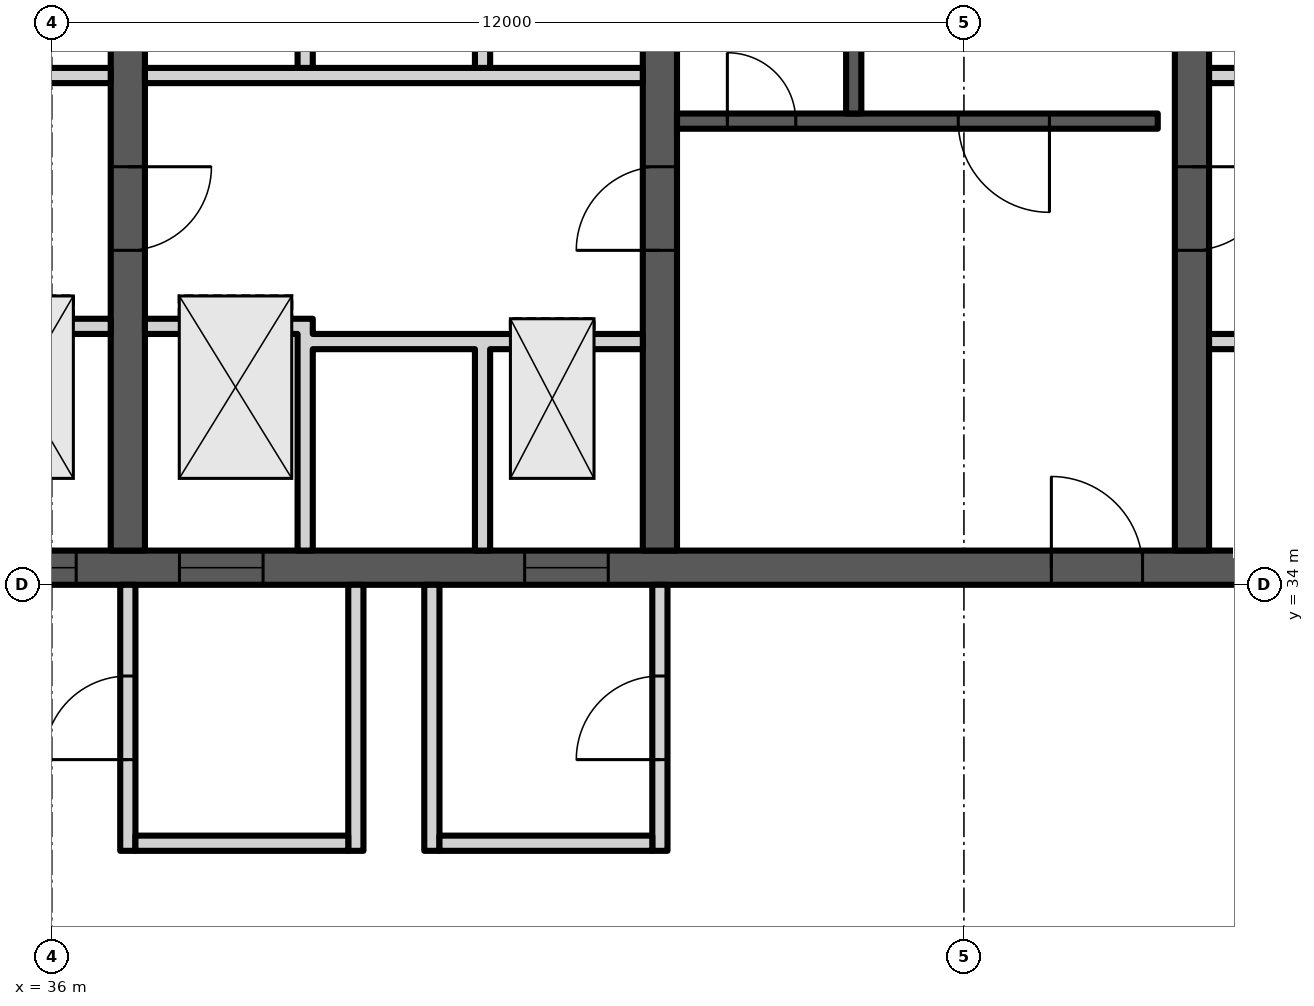
"""IFC4 building model, lengths in metres.
Left out: names, types, materials, properties, quantities, classifications, styles, units other than length and angle.
Written with IfcOpenShell. Run it as: python <this file> out.ifc"""

import sys

from ifc_helpers import new_model, si_unit, direction, frame, frame_2d, origin, place, context, subcontext, project, spatial, polyline, rectangle, outline, extrude, element, fill, save


model = new_model("IFC4")
c1 = context("Model", 3, precision=1e-05, world=origin(), true_north=direction((0.0, 1.0)))
c2 = subcontext(c1, "Body", "Model", "MODEL_VIEW")
j1 = project(units=[si_unit("LENGTHUNIT", "METRE"), si_unit("PLANEANGLEUNIT", "RADIAN")], contexts=[c1])
p1 = place(None, origin())
s1 = spatial("IfcSite", under=j1, at=p1, CompositionType="ELEMENT")
p2 = place(p1, origin())
s2 = spatial("IfcBuilding", under=s1, at=p2, CompositionType="ELEMENT")
p3 = place(p2, frame((0.0, 0.0, 261.1)))
s3 = spatial("IfcBuildingStorey", under=s2, at=p3, CompositionType="ELEMENT", Elevation=261.1)
p4 = place(p3, frame((23.0, 34.225, 0.0), z_axis=(0.0, 0.0, 1.0), x_axis=(1.0, 0.0, 0.0)))
e1 = element("IfcWall", 1, at=p4, inside=s3, PredefinedType="SHEAR", context=c2, shape_type="SweptSolid", body=[
    extrude(outline(polyline([(0.0, 0.0), (35.0, 0.0), (35.0, 3.2), (30.625, 3.2), (26.25, 3.2), (21.875, 3.2), (17.5, 3.2), (13.125, 3.2), (8.75, 3.2), (4.375, 3.2), (0.0, 2.365), (0.0, 0.0)])), frame((0.0, 0.225, 0.0), z_axis=(0.0, -1.0, 0.0), x_axis=(1.0, 0.0, 0.0)), (0.0, 0.0, 1.0), 0.45),
])
p5 = place(p4, frame((0.65, 0.0, 0.0)))
e2 = element("IfcOpeningElement", 2, at=p5, cuts=e1, PredefinedType="OPENING", context=c2, shape_type="SweptSolid", body=[
    extrude(rectangle(XDim=1.2, YDim=2.1, at=frame_2d((0.6, 1.05))), frame((0.0, 0.235, 0.0), z_axis=(0.0, -1.0, 0.0), x_axis=(1.0, 0.0, 0.0)), (0.0, 0.0, 1.0), 0.47),
])
p6 = place(p4, frame((7.679, 0.0, 0.0)))
e3 = element("IfcOpeningElement", 3, at=p6, cuts=e1, PredefinedType="OPENING", context=c2, shape_type="SweptSolid", body=[
    extrude(rectangle(XDim=1.1, YDim=2.1, at=frame_2d((0.55, 1.05))), frame((0.0, 0.235, 0.0), z_axis=(0.0, -1.0, 0.0), x_axis=(1.0, 0.0, 0.0)), (0.0, 0.0, 1.0), 0.47),
])
p7 = place(p4, frame((12.221, 0.0, 0.0)))
e4 = element("IfcOpeningElement", 4, at=p7, cuts=e1, PredefinedType="OPENING", context=c2, shape_type="SweptSolid", body=[
    extrude(rectangle(XDim=1.1, YDim=2.1, at=frame_2d((0.55, 1.05))), frame((0.0, 0.235, 0.0), z_axis=(0.0, -1.0, 0.0), x_axis=(1.0, 0.0, 0.0)), (0.0, 0.0, 1.0), 0.47),
])
p8 = place(p4, frame((9.8, 0.0, 0.0)))
e5 = element("IfcOpeningElement", 5, at=p8, cuts=e1, PredefinedType="OPENING", context=c2, shape_type="SweptSolid", body=[
    extrude(rectangle(XDim=1.4, YDim=2.1, at=frame_2d((0.7, 1.05))), frame((0.0, 0.235, 0.0), z_axis=(0.0, -1.0, 0.0), x_axis=(1.0, 0.0, 0.0)), (0.0, 0.0, 1.0), 0.47),
])
p9 = place(p4, frame((14.679, 0.0, 0.0)))
e6 = element("IfcOpeningElement", 6, at=p9, cuts=e1, PredefinedType="OPENING", context=c2, shape_type="SweptSolid", body=[
    extrude(rectangle(XDim=1.1, YDim=2.1, at=frame_2d((0.55, 1.05))), frame((0.0, 0.235, 0.0), z_axis=(0.0, -1.0, 0.0), x_axis=(1.0, 0.0, 0.0)), (0.0, 0.0, 1.0), 0.47),
])
p10 = place(p4, frame((19.221, 0.0, 0.0)))
e7 = element("IfcOpeningElement", 7, at=p10, cuts=e1, PredefinedType="OPENING", context=c2, shape_type="SweptSolid", body=[
    extrude(rectangle(XDim=1.1, YDim=2.1, at=frame_2d((0.55, 1.05))), frame((0.0, 0.235, 0.0), z_axis=(0.0, -1.0, 0.0), x_axis=(1.0, 0.0, 0.0)), (0.0, 0.0, 1.0), 0.47),
])
p11 = place(p4, frame((26.15, 0.0, 0.0)))
e8 = element("IfcOpeningElement", 8, at=p11, cuts=e1, PredefinedType="OPENING", context=c2, shape_type="SweptSolid", body=[
    extrude(rectangle(XDim=1.2, YDim=2.1, at=frame_2d((0.6, 1.05))), frame((0.0, 0.235, 0.0), z_axis=(0.0, -1.0, 0.0), x_axis=(1.0, 0.0, 0.0)), (0.0, 0.0, 1.0), 0.47),
])
p12 = place(p4, frame((28.729, 0.0, 0.0)))
e9 = element("IfcOpeningElement", 9, at=p12, cuts=e1, PredefinedType="OPENING", context=c2, shape_type="SweptSolid", body=[
    extrude(rectangle(XDim=1.0, YDim=2.1, at=frame_2d((0.5, 1.05))), frame((0.0, 0.235, 0.0), z_axis=(0.0, -1.0, 0.0), x_axis=(1.0, 0.0, 0.0)), (0.0, 0.0, 1.0), 0.47),
])
p13 = place(p4, frame((33.271, 0.0, 0.0)))
e10 = element("IfcOpeningElement", 10, at=p13, cuts=e1, PredefinedType="OPENING", context=c2, shape_type="SweptSolid", body=[
    extrude(rectangle(XDim=1.0, YDim=2.1, at=frame_2d((0.5, 1.05))), frame((0.0, 0.235, 0.0), z_axis=(0.0, -1.0, 0.0), x_axis=(1.0, 0.0, 0.0)), (0.0, 0.0, 1.0), 0.47),
])
p14 = place(p4, frame((30.8, 0.0, 0.0)))
e11 = element("IfcOpeningElement", 11, at=p14, cuts=e1, PredefinedType="OPENING", context=c2, shape_type="SweptSolid", body=[
    extrude(rectangle(XDim=1.4, YDim=2.1, at=frame_2d((0.7, 1.05))), frame((0.0, 0.235, 0.0), z_axis=(0.0, -1.0, 0.0), x_axis=(1.0, 0.0, 0.0)), (0.0, 0.0, 1.0), 0.47),
])
p15 = place(p3, frame((37.0, 34.45, 0.0), z_axis=(0.0, 0.0, 1.0), x_axis=(0.0, 1.0, 0.0)))
e12 = element("IfcWall", 12, at=p15, inside=s3, PredefinedType="SHEAR", context=c2, shape_type="SweptSolid", body=[
    extrude(rectangle(XDim=15.091, YDim=0.45, at=frame_2d((7.545, 0.0))), origin(), (0.0, 0.0, 1.0), 3.2),
])
p16 = place(p15, frame((11.524, 0.0, 0.0)))
e13 = element("IfcOpeningElement", 13, at=p16, cuts=e12, PredefinedType="OPENING", context=c2, shape_type="SweptSolid", body=[
    extrude(rectangle(XDim=1.0, YDim=2.1, at=frame_2d((0.5, 1.05))), frame((0.0, 0.235, 0.0), z_axis=(0.0, -1.0, 0.0), x_axis=(1.0, 0.0, 0.0)), (0.0, 0.0, 1.0), 0.47),
])
p17 = place(p15, frame((3.95, 0.0, 0.0)))
e14 = element("IfcOpeningElement", 14, at=p17, cuts=e12, PredefinedType="OPENING", context=c2, shape_type="SweptSolid", body=[
    extrude(rectangle(XDim=1.1, YDim=2.1, at=frame_2d((0.55, 1.05))), frame((0.0, 0.235, 0.0), z_axis=(0.0, -1.0, 0.0), x_axis=(1.0, 0.0, 0.0)), (0.0, 0.0, 1.0), 0.47),
])
p18 = place(p3, frame((44.0, 34.45, 0.0), z_axis=(0.0, 0.0, 1.0), x_axis=(0.0, 1.0, 0.0)))
e15 = element("IfcWall", 15, at=p18, inside=s3, PredefinedType="SHEAR", context=c2, shape_type="SweptSolid", body=[
    extrude(rectangle(XDim=14.479, YDim=0.45, at=frame_2d((7.239, 0.0))), origin(), (0.0, 0.0, 1.0), 3.2),
])
p19 = place(p18, frame((11.524, 0.0, 0.0)))
e16 = element("IfcOpeningElement", 16, at=p19, cuts=e15, PredefinedType="OPENING", context=c2, shape_type="SweptSolid", body=[
    extrude(rectangle(XDim=1.0, YDim=2.1, at=frame_2d((0.5, 1.05))), frame((0.0, 0.235, 0.0), z_axis=(0.0, -1.0, 0.0), x_axis=(1.0, 0.0, 0.0)), (0.0, 0.0, 1.0), 0.47),
])
p20 = place(p18, frame((3.95, 0.0, 0.0)))
e17 = element("IfcOpeningElement", 17, at=p20, cuts=e15, PredefinedType="OPENING", context=c2, shape_type="SweptSolid", body=[
    extrude(rectangle(XDim=1.1, YDim=2.1, at=frame_2d((0.55, 1.05))), frame((0.0, 0.235, 0.0), z_axis=(0.0, -1.0, 0.0), x_axis=(1.0, 0.0, 0.0)), (0.0, 0.0, 1.0), 0.47),
])
p21 = place(p3, frame((51.0, 34.45, 0.0), z_axis=(0.0, 0.0, 1.0), x_axis=(0.0, 1.0, 0.0)))
e18 = element("IfcWall", 18, at=p21, inside=s3, PredefinedType="SHEAR", context=c2, shape_type="SweptSolid", body=[
    extrude(rectangle(XDim=13.866, YDim=0.45, at=frame_2d((6.933, 0.0))), origin(), (0.0, 0.0, 1.0), 3.2),
])
p22 = place(p21, frame((3.95, 0.0, 0.0)))
e19 = element("IfcOpeningElement", 19, at=p22, cuts=e18, PredefinedType="OPENING", context=c2, shape_type="SweptSolid", body=[
    extrude(rectangle(XDim=1.1, YDim=2.1, at=frame_2d((0.55, 1.05))), frame((0.0, 0.235, 0.0), z_axis=(0.0, -1.0, 0.0), x_axis=(1.0, 0.0, 0.0)), (0.0, 0.0, 1.0), 0.47),
])
p23 = place(p3, frame((30.225, 40.7, 0.0), z_axis=(0.0, 0.0, 1.0), x_axis=(1.0, 0.0, 0.0)))
e20 = element("IfcWall", 20, at=p23, inside=s3, PredefinedType="PARTITIONING", context=c2, shape_type="SweptSolid", body=[
    extrude(rectangle(XDim=6.55, YDim=0.2, at=frame_2d((3.275, 0.0))), origin(), (0.0, 0.0, 1.0), 2.8),
])
p24 = place(p3, frame((0.0, 0.0, -0.0)))
e21 = element("IfcWall", 21, at=p24, inside=s3, PredefinedType="PARTITIONING", context=c2, shape_type="SweptSolid", body=[
    extrude(outline(polyline([(34.567, 37.5), (34.767, 37.5), (36.775, 37.5), (36.775, 37.3), (34.767, 37.3), (34.767, 34.45), (34.567, 34.45), (34.567, 37.5)])), origin(), (0.0, 0.0, 1.0), 2.8),
])
p25 = place(p3, frame((0.0, 0.0, -0.0)))
e22 = element("IfcWall", 22, at=p25, inside=s3, PredefinedType="PARTITIONING", context=c2, shape_type="SweptSolid", body=[
    extrude(outline(polyline([(32.433, 40.8), (32.233, 40.8), (32.233, 43.8), (30.225, 43.8), (30.225, 44.0), (36.775, 44.0), (36.775, 43.8), (34.767, 43.8), (34.767, 40.8), (34.567, 40.8), (34.567, 43.8), (32.433, 43.8), (32.433, 40.8)])), origin(), (0.0, 0.0, 1.0), 2.8),
])
p26 = place(p3, frame((37.225, 40.7, 0.0), z_axis=(0.0, 0.0, 1.0), x_axis=(1.0, 0.0, 0.0)))
e23 = element("IfcWall", 23, at=p26, inside=s3, PredefinedType="PARTITIONING", context=c2, shape_type="SweptSolid", body=[
    extrude(rectangle(XDim=6.55, YDim=0.2, at=frame_2d((3.275, 0.0))), origin(), (0.0, 0.0, 1.0), 2.8),
])
p27 = place(p3, frame((0.0, 0.0, -0.0)))
e24 = element("IfcWall", 24, at=p27, inside=s3, PredefinedType="PARTITIONING", context=c2, shape_type="SweptSolid", body=[
    extrude(outline(polyline([(41.567, 37.1), (39.433, 37.1), (39.433, 34.45), (39.233, 34.45), (39.233, 37.3), (37.225, 37.3), (37.225, 37.5), (39.233, 37.5), (39.433, 37.5), (39.433, 37.3), (41.567, 37.3), (41.767, 37.3), (43.775, 37.3), (43.775, 37.1), (41.767, 37.1), (41.767, 34.45), (41.567, 34.45), (41.567, 37.1)])), origin(), (0.0, 0.0, 1.0), 2.8),
])
p28 = place(p3, frame((0.0, 0.0, -0.0)))
e25 = element("IfcWall", 25, at=p28, inside=s3, PredefinedType="PARTITIONING", context=c2, shape_type="SweptSolid", body=[
    extrude(outline(polyline([(39.433, 40.8), (39.233, 40.8), (39.233, 43.8), (37.225, 43.8), (37.225, 44.0), (43.775, 44.0), (43.775, 43.8), (41.767, 43.8), (41.767, 40.8), (41.567, 40.8), (41.567, 43.8), (39.433, 43.8), (39.433, 40.8)])), origin(), (0.0, 0.0, 1.0), 2.8),
])
p29 = place(p3, frame((44.225, 40.1, 0.0), z_axis=(0.0, 0.0, 1.0), x_axis=(1.0, 0.0, 0.0)))
e26 = element("IfcWall", 26, at=p29, inside=s3, PredefinedType="SHEAR", context=c2, shape_type="SweptSolid", body=[
    extrude(rectangle(XDim=6.325, YDim=0.2, at=frame_2d((3.163, 0.0))), origin(), (0.0, 0.0, 1.0), 2.8),
])
p30 = place(p29, frame((3.7, 0.0, 0.0)))
e27 = element("IfcOpeningElement", 27, at=p30, cuts=e26, PredefinedType="OPENING", context=c2, shape_type="SweptSolid", body=[
    extrude(rectangle(XDim=1.2, YDim=2.1, at=frame_2d((0.6, 1.05))), frame((0.0, 0.11, 0.0), z_axis=(0.0, -1.0, 0.0), x_axis=(1.0, 0.0, 0.0)), (0.0, 0.0, 1.0), 0.22),
])
p31 = place(p29, frame((0.663, 0.0, 0.0)))
e28 = element("IfcOpeningElement", 28, at=p31, cuts=e26, PredefinedType="OPENING", context=c2, shape_type="SweptSolid", body=[
    extrude(rectangle(XDim=0.9, YDim=2.1, at=frame_2d((0.45, 1.05))), frame((0.0, 0.11, 0.0), z_axis=(0.0, -1.0, 0.0), x_axis=(1.0, 0.0, 0.0)), (0.0, 0.0, 1.0), 0.22),
])
p32 = place(p3, frame((46.55, 40.2, 0.0), z_axis=(0.0, 0.0, 1.0), x_axis=(0.0, 1.0, 0.0)))
e29 = element("IfcWall", 29, at=p32, inside=s3, PredefinedType="SHEAR", context=c2, shape_type="SweptSolid", body=[
    extrude(rectangle(XDim=7.2, YDim=0.2, at=frame_2d((3.6, 0.0))), origin(), (0.0, 0.0, 1.0), 2.8),
])
p33 = place(p3, frame((51.225, 37.2, 0.0), z_axis=(0.0, 0.0, 1.0), x_axis=(1.0, 0.0, 0.0)))
e30 = element("IfcWall", 30, at=p33, inside=s3, PredefinedType="PARTITIONING", context=c2, shape_type="SweptSolid", body=[
    extrude(rectangle(XDim=2.008, YDim=0.2, at=frame_2d((1.004, 0.0))), origin(), (0.0, 0.0, 1.0), 2.8),
])
p34 = place(p33, frame((0.504, 0.0, 0.0)))
e31 = element("IfcOpeningElement", 31, at=p34, cuts=e30, PredefinedType="OPENING", context=c2, shape_type="SweptSolid", body=[
    extrude(rectangle(XDim=1.0, YDim=2.1, at=frame_2d((0.5, 1.05))), frame((0.0, 0.11, 0.0), z_axis=(0.0, -1.0, 0.0), x_axis=(1.0, 0.0, 0.0)), (0.0, 0.0, 1.0), 0.22),
])
p35 = place(p3, frame((51.225, 40.7, 0.0), z_axis=(0.0, 0.0, 1.0), x_axis=(1.0, 0.0, 0.0)))
e32 = element("IfcWall", 32, at=p35, inside=s3, PredefinedType="PARTITIONING", context=c2, shape_type="SweptSolid", body=[
    extrude(rectangle(XDim=6.55, YDim=0.2, at=frame_2d((3.275, 0.0))), origin(), (0.0, 0.0, 1.0), 2.8),
])
p36 = place(p35, frame((3.879, 0.0, 0.0)))
e33 = element("IfcOpeningElement", 33, at=p36, cuts=e32, PredefinedType="OPENING", context=c2, shape_type="SweptSolid", body=[
    extrude(rectangle(XDim=1.0, YDim=2.1, at=frame_2d((0.5, 1.05))), frame((0.0, 0.11, 0.0), z_axis=(0.0, -1.0, 0.0), x_axis=(1.0, 0.0, 0.0)), (0.0, 0.0, 1.0), 0.22),
])
p37 = place(p3, frame((37.0, 30.5, 0.0), z_axis=(0.0, 0.0, 1.0), x_axis=(0.0, 1.0, 0.0)))
e34 = element("IfcWall", 34, at=p37, inside=s3, PredefinedType="PARTITIONING", context=c2, shape_type="SweptSolid", body=[
    extrude(rectangle(XDim=3.5, YDim=0.2, at=frame_2d((1.75, 0.0))), origin(), (0.0, 0.0, 1.0), 2.8),
])
p38 = place(p37, frame((1.2, 0.0, 0.0)))
e35 = element("IfcOpeningElement", 35, at=p38, cuts=e34, PredefinedType="OPENING", context=c2, shape_type="SweptSolid", body=[
    extrude(rectangle(XDim=1.1, YDim=2.1, at=frame_2d((0.55, 1.05))), frame((0.0, 0.11, 0.0), z_axis=(0.0, -1.0, 0.0), x_axis=(1.0, 0.0, 0.0)), (0.0, 0.0, 1.0), 0.22),
])
p39 = place(p3, frame((40.0, 30.5, 0.0), z_axis=(0.0, 0.0, 1.0), x_axis=(0.0, 1.0, 0.0)))
e36 = element("IfcWall", 36, at=p39, inside=s3, PredefinedType="PARTITIONING", context=c2, shape_type="SweptSolid", body=[
    extrude(rectangle(XDim=3.5, YDim=0.2, at=frame_2d((1.75, 0.0))), origin(), (0.0, 0.0, 1.0), 2.8),
])
p40 = place(p3, frame((37.1, 30.6, 0.0), z_axis=(0.0, 0.0, 1.0), x_axis=(1.0, 0.0, 0.0)))
e37 = element("IfcWall", 37, at=p40, inside=s3, PredefinedType="PARTITIONING", context=c2, shape_type="SweptSolid", body=[
    extrude(rectangle(XDim=2.8, YDim=0.2, at=frame_2d((1.4, 0.0))), origin(), (0.0, 0.0, 1.0), 2.8),
])
p41 = place(p3, frame((41.0, 30.5, 0.0), z_axis=(0.0, 0.0, 1.0), x_axis=(0.0, 1.0, 0.0)))
e38 = element("IfcWall", 38, at=p41, inside=s3, PredefinedType="PARTITIONING", context=c2, shape_type="SweptSolid", body=[
    extrude(rectangle(XDim=3.5, YDim=0.2, at=frame_2d((1.75, 0.0))), origin(), (0.0, 0.0, 1.0), 2.8),
])
p42 = place(p3, frame((44.0, 30.5, 0.0), z_axis=(0.0, 0.0, 1.0), x_axis=(0.0, 1.0, 0.0)))
e39 = element("IfcWall", 39, at=p42, inside=s3, PredefinedType="PARTITIONING", context=c2, shape_type="SweptSolid", body=[
    extrude(rectangle(XDim=3.5, YDim=0.2, at=frame_2d((1.75, 0.0))), origin(), (0.0, 0.0, 1.0), 2.8),
])
p43 = place(p42, frame((1.2, 0.0, 0.0)))
e40 = element("IfcOpeningElement", 40, at=p43, cuts=e39, PredefinedType="OPENING", context=c2, shape_type="SweptSolid", body=[
    extrude(rectangle(XDim=1.1, YDim=2.1, at=frame_2d((0.55, 1.05))), frame((0.0, 0.11, 0.0), z_axis=(0.0, -1.0, 0.0), x_axis=(1.0, 0.0, 0.0)), (0.0, 0.0, 1.0), 0.22),
])
p44 = place(p3, frame((41.1, 30.6, 0.0), z_axis=(0.0, 0.0, 1.0), x_axis=(1.0, 0.0, 0.0)))
e41 = element("IfcWall", 41, at=p44, inside=s3, PredefinedType="PARTITIONING", context=c2, shape_type="SweptSolid", body=[
    extrude(rectangle(XDim=2.8, YDim=0.2, at=frame_2d((1.4, 0.0))), origin(), (0.0, 0.0, 1.0), 2.8),
])
p45 = place(p7, origin())
e42 = element("IfcDoor", 42, at=p45, inside=s3, OperationType="DOUBLE_DOOR_SLIDING", PredefinedType="DOOR", context=c2, shape_type="SweptSolid", body=[
    extrude(rectangle(XDim=1.1, YDim=2.1, at=frame_2d((0.55, 1.05))), frame((0.0, 0.025, 0.0), z_axis=(0.0, -1.0, 0.0), x_axis=(1.0, 0.0, 0.0)), (0.0, 0.0, 1.0), 0.05),
])
fill(e4, e42)
p46 = place(p9, origin())
e43 = element("IfcDoor", 43, at=p46, inside=s3, OperationType="DOUBLE_DOOR_SLIDING", PredefinedType="DOOR", context=c2, shape_type="SweptSolid", body=[
    extrude(rectangle(XDim=1.1, YDim=2.1, at=frame_2d((0.55, 1.05))), frame((0.0, 0.025, 0.0), z_axis=(0.0, -1.0, 0.0), x_axis=(1.0, 0.0, 0.0)), (0.0, 0.0, 1.0), 0.05),
])
fill(e6, e43)
p47 = place(p10, origin())
e44 = element("IfcDoor", 44, at=p47, inside=s3, OperationType="DOUBLE_DOOR_SLIDING", PredefinedType="DOOR", context=c2, shape_type="SweptSolid", body=[
    extrude(rectangle(XDim=1.1, YDim=2.1, at=frame_2d((0.55, 1.05))), frame((0.0, 0.025, 0.0), z_axis=(0.0, -1.0, 0.0), x_axis=(1.0, 0.0, 0.0)), (0.0, 0.0, 1.0), 0.05),
])
fill(e7, e44)
p48 = place(p30, origin())
e45 = element("IfcDoor", 45, at=p48, inside=s3, OperationType="SINGLE_SWING_RIGHT", PredefinedType="DOOR", context=c2, shape_type="SweptSolid", body=[
    extrude(rectangle(XDim=1.2, YDim=2.1, at=frame_2d((0.6, 1.05))), frame((0.0, 0.025, 0.0), z_axis=(0.0, -1.0, 0.0), x_axis=(1.0, 0.0, 0.0)), (0.0, 0.0, 1.0), 0.05),
])
fill(e27, e45)
p49 = place(p31, origin())
e46 = element("IfcDoor", 46, at=p49, inside=s3, OperationType="SINGLE_SWING_LEFT", PredefinedType="DOOR", context=c2, shape_type="SweptSolid", body=[
    extrude(rectangle(XDim=0.9, YDim=2.1, at=frame_2d((0.45, 1.05))), frame((0.0, 0.025, 0.0), z_axis=(0.0, -1.0, 0.0), x_axis=(1.0, 0.0, 0.0)), (0.0, 0.0, 1.0), 0.05),
])
fill(e28, e46)
p50 = place(p11, origin())
e47 = element("IfcDoor", 47, at=p50, inside=s3, OperationType="SINGLE_SWING_LEFT", PredefinedType="DOOR", context=c2, shape_type="SweptSolid", body=[
    extrude(rectangle(XDim=1.2, YDim=2.1, at=frame_2d((0.6, 1.05))), frame((0.0, 0.025, 0.0), z_axis=(0.0, -1.0, 0.0), x_axis=(1.0, 0.0, 0.0)), (0.0, 0.0, 1.0), 0.05),
])
fill(e8, e47)
p51 = place(p17, origin())
e48 = element("IfcDoor", 48, at=p51, inside=s3, OperationType="SINGLE_SWING_RIGHT", PredefinedType="DOOR", context=c2, shape_type="SweptSolid", body=[
    extrude(rectangle(XDim=1.1, YDim=2.1, at=frame_2d((0.55, 1.05))), frame((0.0, 0.025, 0.0), z_axis=(0.0, -1.0, 0.0), x_axis=(1.0, 0.0, 0.0)), (0.0, 0.0, 1.0), 0.05),
])
fill(e14, e48)
p52 = place(p20, origin())
e49 = element("IfcDoor", 49, at=p52, inside=s3, OperationType="SINGLE_SWING_LEFT", PredefinedType="DOOR", context=c2, shape_type="SweptSolid", body=[
    extrude(rectangle(XDim=1.1, YDim=2.1, at=frame_2d((0.55, 1.05))), frame((0.0, 0.025, 0.0), z_axis=(0.0, -1.0, 0.0), x_axis=(1.0, 0.0, 0.0)), (0.0, 0.0, 1.0), 0.05),
])
fill(e17, e49)
p53 = place(p22, origin())
e50 = element("IfcDoor", 50, at=p53, inside=s3, OperationType="SINGLE_SWING_RIGHT", PredefinedType="DOOR", context=c2, shape_type="SweptSolid", body=[
    extrude(rectangle(XDim=1.1, YDim=2.1, at=frame_2d((0.55, 1.05))), frame((0.0, 0.025, 0.0), z_axis=(0.0, -1.0, 0.0), x_axis=(1.0, 0.0, 0.0)), (0.0, 0.0, 1.0), 0.05),
])
fill(e19, e50)
p54 = place(p38, origin())
e51 = element("IfcDoor", 51, at=p54, inside=s3, OperationType="SINGLE_SWING_LEFT", PredefinedType="DOOR", context=c2, shape_type="SweptSolid", body=[
    extrude(rectangle(XDim=1.1, YDim=2.1, at=frame_2d((0.55, 1.05))), frame((0.0, 0.025, 0.0), z_axis=(0.0, -1.0, 0.0), x_axis=(1.0, 0.0, 0.0)), (0.0, 0.0, 1.0), 0.05),
])
fill(e35, e51)
p55 = place(p43, origin())
e52 = element("IfcDoor", 52, at=p55, inside=s3, OperationType="SINGLE_SWING_LEFT", PredefinedType="DOOR", context=c2, shape_type="SweptSolid", body=[
    extrude(rectangle(XDim=1.1, YDim=2.1, at=frame_2d((0.55, 1.05))), frame((0.0, 0.025, 0.0), z_axis=(0.0, -1.0, 0.0), x_axis=(1.0, 0.0, 0.0)), (0.0, 0.0, 1.0), 0.05),
])
fill(e40, e52)
save(model, sys.argv[1])
